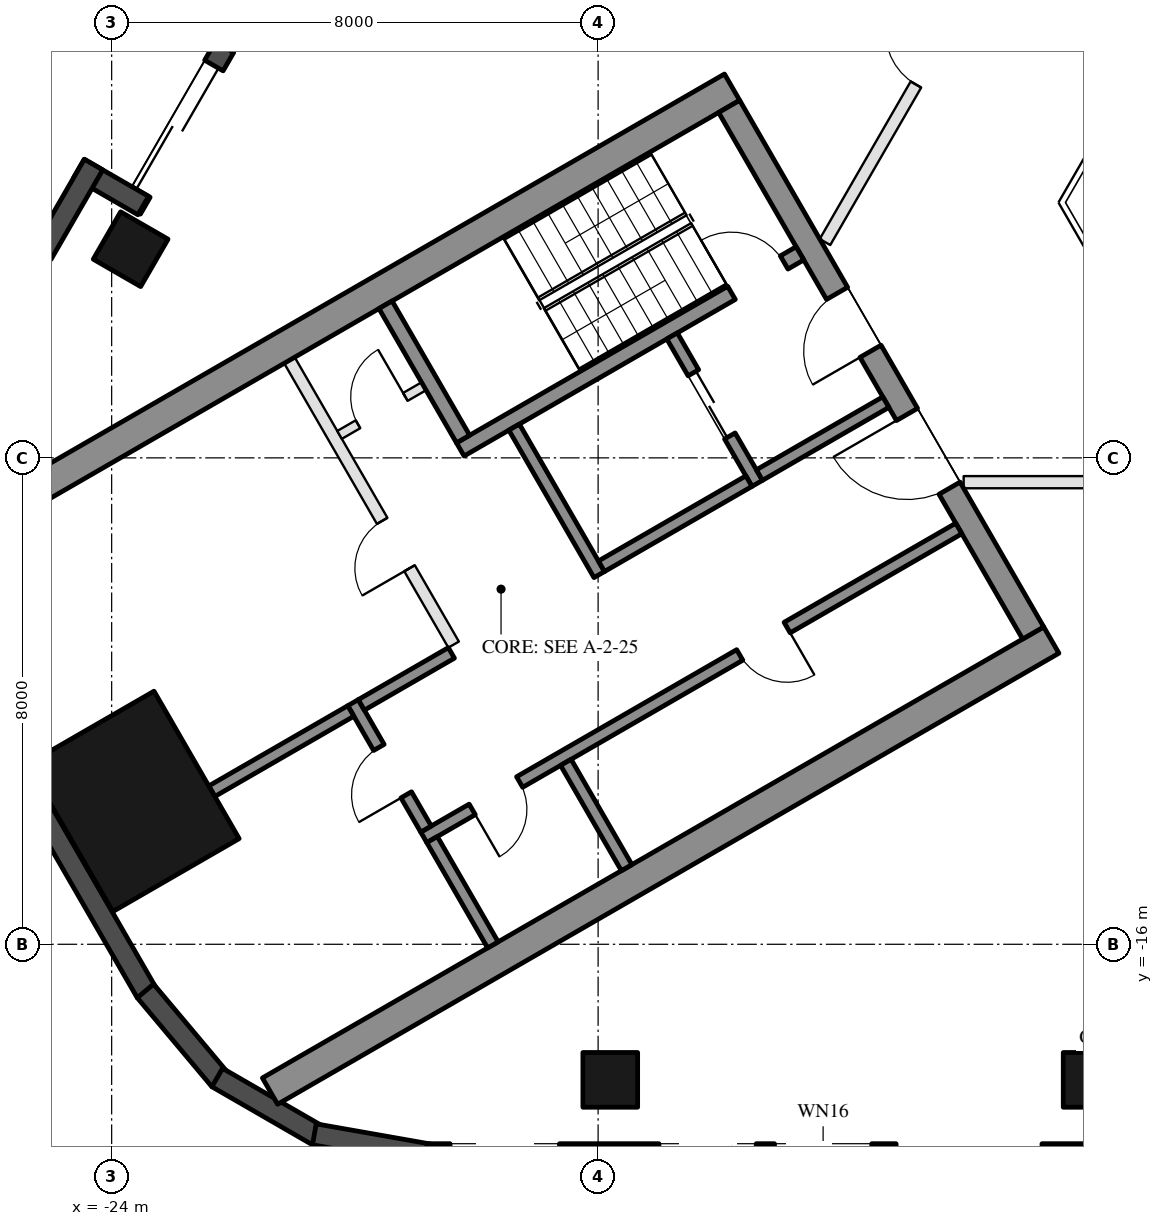
"""IFC4 building model, lengths in metres.
Left out: names, types, materials, properties, quantities, classifications, styles, units other than length and angle.
Written with IfcOpenShell. Run it as: python <this file> out.ifc"""

import sys

from ifc_helpers import new_model, si_unit, direction, frame, frame_2d, origin, origin_2d, place, context, subcontext, project, spatial, rectangle, hollow_rectangle, extrude, element, fill, save


model = new_model("IFC4")
c1 = context("Model", 3, precision=1e-05, world=origin(), true_north=direction((0.0, 1.0)))
c2 = subcontext(c1, "Body", "Model", "MODEL_VIEW")
j1 = project(units=[si_unit("LENGTHUNIT", "METRE"), si_unit("PLANEANGLEUNIT", "RADIAN")], contexts=[c1])
p1 = place(None, origin())
s1 = spatial("IfcSite", under=j1, at=p1, CompositionType="ELEMENT")
p2 = place(p1, origin())
s2 = spatial("IfcBuilding", under=s1, at=p2, CompositionType="ELEMENT")
p3 = place(p2, frame((0.0, 0.0, 113.1)))
s3 = spatial("IfcBuildingStorey", under=s2, at=p3, CompositionType="ELEMENT", Elevation=113.1)
for number, where, z_axis, x_axis in (
    (1, (-15.8, -18.23, 0.0), (0.0, 0.0, 1.0), (-1.0, 0.0, 0.0)),
    (2, (-7.9, -18.23, 0.0), (0.0, 0.0, 1.0), (-1.0, 0.0, 0.0)),
    (3, (-23.688, -4.568, 0.0), (0.0, 0.0, 1.0), (0.5, 0.866, 0.0)),
):
    element("IfcColumn", number, at=place(p3, frame(where, z_axis=z_axis, x_axis=x_axis)), inside=s3, PredefinedType="COLUMN", context=c2, shape_type="SweptSolid", body=[
        extrude(hollow_rectangle(XDim=0.9, YDim=0.9, WallThickness=0.04, at=origin_2d()), origin(), (0.0, 0.0, 1.0), 3.7),
    ])
p4 = place(p3, frame((-23.643, -13.65, 0.0), z_axis=(0.0, 0.0, 1.0), x_axis=(-0.5, 0.866025403784, 0.0)))
e4 = element("IfcColumn", 4, at=p4, inside=s3, PredefinedType="COLUMN", context=c2, shape_type="SweptSolid", body=[
    extrude(hollow_rectangle(XDim=2.8, YDim=2.4, WallThickness=0.07, at=origin_2d()), origin(), (0.0, 0.0, 1.0), 3.7),
])
p5 = place(p3, frame((-20.309, 1.934, 0.0), z_axis=(0.0, 0.0, 1.0), x_axis=(-0.499992114976, -0.866029956157, 0.0)))
e5 = element("IfcWall", 5, at=p5, inside=s3, PredefinedType="SOLIDWALL", context=c2, shape_type="SweptSolid", body=[
    extrude(rectangle(XDim=6.74, YDim=0.35, at=frame_2d((3.37, 0.0))), origin(), (0.0, 0.0, 1.0), 3.55),
])
p6 = place(p5, frame((4.02, 0.0, 0.0)))
e6 = element("IfcOpeningElement", 6, at=p6, cuts=e5, PredefinedType="OPENING", context=c2, shape_type="SweptSolid", body=[
    extrude(rectangle(XDim=2.4, YDim=2.4, at=frame_2d((1.2, 1.2))), frame((0.0, 0.185, 0.0), z_axis=(0.0, -1.0, 0.0), x_axis=(1.0, 0.0, 0.0)), (0.0, 0.0, 1.0), 0.37),
])
p7 = place(p5, frame((0.77, 0.0, 0.3)))
e7 = element("IfcOpeningElement", 7, at=p7, cuts=e5, PredefinedType="OPENING", context=c2, shape_type="SweptSolid", body=[
    extrude(rectangle(XDim=2.9, YDim=2.65, at=frame_2d((1.45, 1.325))), frame((0.0, 0.185, 0.0), z_axis=(0.0, -1.0, 0.0), x_axis=(1.0, 0.0, 0.0)), (0.0, 0.0, 1.0), 0.37),
])
p8 = place(p3, frame((-23.481, -3.85, 0.0), z_axis=(0.0, 0.0, 1.0), x_axis=(-0.866092288191, 0.499884134912, 0.0)))
e8 = element("IfcWall", 8, at=p8, inside=s3, PredefinedType="SOLIDWALL", context=c2, shape_type="SweptSolid", body=[
    extrude(rectangle(XDim=1.22, YDim=0.35, at=frame_2d((0.61, 0.0))), origin(), (0.0, 0.0, 1.0), 3.55),
])
p9 = place(p3, frame((-24.299, -3.176, 0.0), z_axis=(0.0, 0.0, 1.0), x_axis=(-0.500028278809, -0.866009076391, 0.0)))
e9 = element("IfcWall", 9, at=p9, inside=s3, PredefinedType="SOLIDWALL", context=c2, shape_type="SweptSolid", body=[
    extrude(rectangle(XDim=3.916, YDim=0.35, at=frame_2d((1.958, 0.0))), origin(), (0.0, 0.0, 1.0), 3.55),
])
p10 = place(p9, frame((1.7, 0.0, 0.3)))
e10 = element("IfcOpeningElement", 10, at=p10, cuts=e9, PredefinedType="OPENING", context=c2, shape_type="SweptSolid", body=[
    extrude(rectangle(XDim=1.8, YDim=2.65, at=frame_2d((0.9, 1.325))), frame((0.0, 0.185, 0.0), z_axis=(0.0, -1.0, 0.0), x_axis=(1.0, 0.0, 0.0)), (0.0, 0.0, 1.0), 0.37),
])
p11 = place(p3, frame((-26.257, -11.893, 0.0), z_axis=(0.0, 0.0, 1.0), x_axis=(0.500018773155, -0.866014564827, 0.0)))
e11 = element("IfcWall", 11, at=p11, inside=s3, PredefinedType="SOLIDWALL", context=c2, shape_type="SweptSolid", body=[
    extrude(rectangle(XDim=5.658, YDim=0.35, at=frame_2d((2.829, 0.0))), origin(), (0.0, 0.0, 1.0), 3.55),
])
for number, where, z_axis, x_axis in (
    (12, (-23.445, -16.768, 0.0), (0.0, 0.0, 1.0), (0.643, -0.766, 0.0)),
    (13, (-22.264, -18.192, 0.0), (0.0, 0.0, 1.0), (0.866, -0.5, 0.0)),
):
    element("IfcWall", number, at=place(p3, frame(where, z_axis=z_axis, x_axis=x_axis)), inside=s3, PredefinedType="SOLIDWALL", context=c2, shape_type="SweptSolid", body=[
        extrude(rectangle(XDim=1.91, YDim=0.35, at=frame_2d((0.955, 0.0))), origin(), (0.0, 0.0, 1.0), 3.55),
    ])
p12 = place(p3, frame((-20.667, -19.126, 0.0), z_axis=(0.0, 0.0, 1.0), x_axis=(0.984798995425, -0.173697837091, 0.0)))
e14 = element("IfcWall", 14, at=p12, inside=s3, PredefinedType="SOLIDWALL", context=c2, shape_type="SweptSolid", body=[
    extrude(rectangle(XDim=1.91, YDim=0.35, at=frame_2d((0.955, 0.0))), origin(), (0.0, 0.0, 1.0), 3.55),
])
p13 = place(p3, frame((-18.816, -19.455, 0.0), z_axis=(0.0, 0.0, 1.0), x_axis=(1.0, 0.0, 0.0)))
e15 = element("IfcWall", 15, at=p13, inside=s3, PredefinedType="SOLIDWALL", context=c2, shape_type="SweptSolid", body=[
    extrude(rectangle(XDim=11.816, YDim=0.35, at=frame_2d((5.908, 0.0))), origin(), (0.0, 0.0, 1.0), 3.55),
])
p14 = place(p13, frame((0.381, 0.0, 0.3)))
e16 = element("IfcOpeningElement", 16, at=p14, cuts=e15, PredefinedType="OPENING", context=c2, shape_type="SweptSolid", body=[
    extrude(rectangle(XDim=1.8, YDim=2.65, at=frame_2d((0.9, 1.325))), frame((0.0, 0.185, 0.0), z_axis=(0.0, -1.0, 0.0), x_axis=(1.0, 0.0, 0.0)), (0.0, 0.0, 1.0), 0.37),
])
p15 = place(p13, frame((7.716, 0.0, 0.0)))
e17 = element("IfcOpeningElement", 17, at=p15, cuts=e15, PredefinedType="OPENING", context=c2, shape_type="SweptSolid", body=[
    extrude(rectangle(XDim=2.4, YDim=2.4, at=frame_2d((1.2, 1.2))), frame((0.0, 0.185, 0.0), z_axis=(0.0, -1.0, 0.0), x_axis=(1.0, 0.0, 0.0)), (0.0, 0.0, 1.0), 0.37),
])
p16 = place(p13, frame((3.816, 0.0, 0.3)))
e18 = element("IfcOpeningElement", 18, at=p16, cuts=e15, PredefinedType="OPENING", context=c2, shape_type="SweptSolid", body=[
    extrude(rectangle(XDim=1.6, YDim=2.65, at=frame_2d((0.8, 1.325))), frame((0.0, 0.185, 0.0), z_axis=(0.0, -1.0, 0.0), x_axis=(1.0, 0.0, 0.0)), (0.0, 0.0, 1.0), 0.37),
])
p17 = place(p13, frame((5.716, 0.0, 0.3)))
e19 = element("IfcOpeningElement", 19, at=p17, cuts=e15, PredefinedType="OPENING", context=c2, shape_type="SweptSolid", body=[
    extrude(rectangle(XDim=1.6, YDim=2.65, at=frame_2d((0.8, 1.325))), frame((0.0, 0.185, 0.0), z_axis=(0.0, -1.0, 0.0), x_axis=(1.0, 0.0, 0.0)), (0.0, 0.0, 1.0), 0.37),
])
for number, where, z_axis, x_axis in (
    (20, (-13.797, -1.903, 0.0), (0.0, 0.0, 1.0), (-0.866, -0.5, 0.0)),
    (21, (-8.547, -10.997, 0.0), (0.0, 0.0, 1.0), (-0.866, -0.5, 0.0)),
):
    element("IfcWall", number, at=place(p3, frame(where, z_axis=z_axis, x_axis=x_axis)), inside=s3, PredefinedType="SHEAR", context=c2, shape_type="SweptSolid", body=[
        extrude(rectangle(XDim=14.837, YDim=0.5, at=frame_2d((7.418, 0.0))), origin(), (0.0, 0.0, 1.0), 3.5),
    ])
p18 = place(p3, frame((-13.845, -2.22, 0.0), z_axis=(0.0, 0.0, 1.0), x_axis=(0.500004234368, -0.866022959057, 0.0)))
e22 = element("IfcWall", 22, at=p18, inside=s3, PredefinedType="SHEAR", context=c2, shape_type="SweptSolid", body=[
    extrude(rectangle(XDim=10.0, YDim=0.4, at=frame_2d((5.0, 0.0))), origin(), (0.0, 0.0, 1.0), 3.5),
])
p19 = place(p18, frame((3.55, 0.0, 0.0)))
e23 = element("IfcOpeningElement", 23, at=p19, cuts=e22, PredefinedType="OPENING", context=c2, shape_type="SweptSolid", body=[
    extrude(rectangle(XDim=1.1, YDim=2.1, at=frame_2d((0.55, 1.05))), frame((0.0, 0.21, 0.0), z_axis=(0.0, -1.0, 0.0), x_axis=(1.0, 0.0, 0.0)), (0.0, 0.0, 1.0), 0.42),
])
p20 = place(p18, frame((5.85, 0.0, 0.0)))
e24 = element("IfcOpeningElement", 24, at=p20, cuts=e22, PredefinedType="OPENING", context=c2, shape_type="SweptSolid", body=[
    extrude(rectangle(XDim=1.4, YDim=2.1, at=frame_2d((0.7, 1.05))), frame((0.0, 0.21, 0.0), z_axis=(0.0, -1.0, 0.0), x_axis=(1.0, 0.0, 0.0)), (0.0, 0.0, 1.0), 0.42),
])
p21 = place(p3, frame((-12.681, -4.636, 0.0), z_axis=(0.0, 0.0, 1.0), x_axis=(-0.866021702275, -0.500006411147, 0.0)))
e25 = element("IfcWall", 25, at=p21, inside=s3, PredefinedType="SHEAR", context=c2, shape_type="SweptSolid", body=[
    extrude(rectangle(XDim=6.45, YDim=0.25, at=frame_2d((3.225, 0.0))), origin(), (0.0, 0.0, 1.0), 3.5),
])
p22 = place(p21, frame((0.3, 0.0, 0.0)))
e26 = element("IfcOpeningElement", 26, at=p22, cuts=e25, PredefinedType="OPENING", context=c2, shape_type="SweptSolid", body=[
    extrude(rectangle(XDim=1.0, YDim=2.1, at=frame_2d((0.5, 1.05))), frame((0.0, 0.135, 0.0), z_axis=(0.0, -1.0, 0.0), x_axis=(1.0, 0.0, 0.0)), (0.0, 0.0, 1.0), 0.27),
])
p23 = place(p3, frame((-19.496, -5.482, 0.0), z_axis=(0.0, 0.0, 1.0), x_axis=(0.499990435942, -0.866030925526, 0.0)))
e27 = element("IfcWall", 27, at=p23, inside=s3, PredefinedType="SHEAR", context=c2, shape_type="SweptSolid", body=[
    extrude(rectangle(XDim=2.55, YDim=0.25, at=frame_2d((1.275, 0.0))), origin(), (0.0, 0.0, 1.0), 3.5),
])
p24 = place(p3, frame((-17.381, -7.495, 0.0), z_axis=(0.0, 0.0, 1.0), x_axis=(0.500011755427, -0.866018616679, 0.0)))
e28 = element("IfcWall", 28, at=p24, inside=s3, PredefinedType="SHEAR", context=c2, shape_type="SweptSolid", body=[
    extrude(rectangle(XDim=2.8, YDim=0.2, at=frame_2d((1.4, 0.0))), origin(), (0.0, 0.0, 1.0), 3.5),
])
p25 = place(p3, frame((-14.783, -5.995, 0.0), z_axis=(0.0, 0.0, 1.0), x_axis=(0.49994636267, -0.866056369097, 0.0)))
e29 = element("IfcWall", 29, at=p25, inside=s3, PredefinedType="SHEAR", context=c2, shape_type="SweptSolid", body=[
    extrude(rectangle(XDim=2.8, YDim=0.2, at=frame_2d((1.4, 0.0))), origin(), (0.0, 0.0, 1.0), 3.5),
])
p26 = place(p25, frame((0.7, 0.0, 0.0)))
e30 = element("IfcOpeningElement", 30, at=p26, cuts=e29, PredefinedType="OPENING", context=c2, shape_type="SweptSolid", body=[
    extrude(rectangle(XDim=1.2, YDim=2.1, at=frame_2d((0.6, 1.05))), frame((0.0, 0.11, 0.0), z_axis=(0.0, -1.0, 0.0), x_axis=(1.0, 0.0, 0.0)), (0.0, 0.0, 1.0), 0.22),
])
p27 = place(p3, frame((-13.52, -8.383, 0.0), z_axis=(0.0, 0.0, 1.0), x_axis=(-0.866034573852, -0.49998411664, 0.0)))
e31 = element("IfcWall", 31, at=p27, inside=s3, PredefinedType="SHEAR", context=c2, shape_type="SweptSolid", body=[
    extrude(rectangle(XDim=2.8, YDim=0.2, at=frame_2d((1.4, 0.0))), origin(), (0.0, 0.0, 1.0), 3.5),
])
p28 = place(p3, frame((-11.268, -7.083, 0.0), z_axis=(0.0, 0.0, 1.0), x_axis=(-0.866050077142, -0.499957262057, 0.0)))
e32 = element("IfcWall", 32, at=p28, inside=s3, PredefinedType="SHEAR", context=c2, shape_type="SweptSolid", body=[
    extrude(rectangle(XDim=2.4, YDim=0.2, at=frame_2d((1.2, 0.0))), origin(), (0.0, 0.0, 1.0), 3.5),
])
p29 = place(p3, frame((-10.068, -9.162, 0.0), z_axis=(0.0, 0.0, 1.0), x_axis=(-0.866032725843, -0.499987317609, 0.0)))
e33 = element("IfcWall", 33, at=p29, inside=s3, PredefinedType="SHEAR", context=c2, shape_type="SweptSolid", body=[
    extrude(rectangle(XDim=10.16, YDim=0.2, at=frame_2d((5.08, 0.0))), origin(), (0.0, 0.0, 1.0), 3.5),
])
p30 = place(p29, frame((3.26, 0.0, 0.0)))
e34 = element("IfcOpeningElement", 34, at=p30, cuts=e33, PredefinedType="OPENING", context=c2, shape_type="SweptSolid", body=[
    extrude(rectangle(XDim=0.9, YDim=2.1, at=frame_2d((0.45, 1.05))), frame((0.0, 0.11, 0.0), z_axis=(0.0, -1.0, 0.0), x_axis=(1.0, 0.0, 0.0)), (0.0, 0.0, 1.0), 0.22),
])
p31 = place(p29, frame((8.34, 0.0, 0.0)))
e35 = element("IfcOpeningElement", 35, at=p31, cuts=e33, PredefinedType="OPENING", context=c2, shape_type="SweptSolid", body=[
    extrude(rectangle(XDim=0.9, YDim=2.1, at=frame_2d((0.45, 1.05))), frame((0.0, 0.11, 0.0), z_axis=(0.0, -1.0, 0.0), x_axis=(1.0, 0.0, 0.0)), (0.0, 0.0, 1.0), 0.22),
])
p32 = place(p3, frame((-20.031, -12.026, 0.0), z_axis=(0.0, 0.0, 1.0), x_axis=(0.500033551112, -0.866006032174, 0.0)))
e36 = element("IfcWall", 36, at=p32, inside=s3, PredefinedType="SHEAR", context=c2, shape_type="SweptSolid", body=[
    extrude(rectangle(XDim=2.4, YDim=0.2, at=frame_2d((1.2, 0.0))), origin(), (0.0, 0.0, 1.0), 3.5),
])
p33 = place(p32, frame((0.85, 0.0, 0.0)))
e37 = element("IfcOpeningElement", 37, at=p33, cuts=e36, PredefinedType="OPENING", context=c2, shape_type="SweptSolid", body=[
    extrude(rectangle(XDim=0.9, YDim=2.1, at=frame_2d((0.45, 1.05))), frame((0.0, 0.11, 0.0), z_axis=(0.0, -1.0, 0.0), x_axis=(1.0, 0.0, 0.0)), (0.0, 0.0, 1.0), 0.22),
])
p34 = place(p3, frame((-18.413, -11.208, 0.0), z_axis=(0.0, 0.0, 1.0), x_axis=(-0.866038183914, -0.499977863513, 0.0)))
e38 = element("IfcWall", 38, at=p34, inside=s3, PredefinedType="SHEAR", context=c2, shape_type="SweptSolid", body=[
    extrude(rectangle(XDim=1.71, YDim=0.2, at=frame_2d((0.855, 0.0))), origin(), (0.0, 0.0, 1.0), 3.5),
])
for number, where, z_axis, x_axis in (
    (39, (-16.531, -13.008, 0.0), (0.0, 0.0, 1.0), (0.5, -0.866, 0.0)),
    (40, (-18.73, -14.278, 0.0), (0.0, 0.0, 1.0), (0.5, -0.866, 0.0)),
):
    element("IfcWall", number, at=place(p3, frame(where, z_axis=z_axis, x_axis=x_axis)), inside=s3, PredefinedType="SHEAR", context=c2, shape_type="SweptSolid", body=[
        extrude(rectangle(XDim=2.0, YDim=0.2, at=frame_2d((1.0, 0.0))), origin(), (0.0, 0.0, 1.0), 3.5),
    ])
p35 = place(p3, frame((-20.067, -12.163, 0.0), z_axis=(0.0, 0.0, 1.0), x_axis=(-0.866060851709, -0.499938597367, 0.0)))
e41 = element("IfcWall", 41, at=p35, inside=s3, PredefinedType="SHEAR", context=c2, shape_type="SweptSolid", body=[
    extrude(rectangle(XDim=2.64, YDim=0.2, at=frame_2d((1.32, 0.0))), origin(), (0.0, 0.0, 1.0), 3.5),
])
p36 = place(p3, frame((-21.076, -6.395, 0.0), z_axis=(0.0, 0.0, 1.0), x_axis=(0.50001468107, -0.866016927499, 0.0)))
e42 = element("IfcWall", 42, at=p36, inside=s3, PredefinedType="PARTITIONING", context=c2, shape_type="SweptSolid", body=[
    extrude(rectangle(XDim=5.4, YDim=0.2, at=frame_2d((2.7, 0.0))), origin(), (0.0, 0.0, 1.0), 3.5),
])
p37 = place(p36, frame((3.05, 0.0, 0.0)))
e43 = element("IfcOpeningElement", 43, at=p37, cuts=e42, PredefinedType="OPENING", context=c2, shape_type="SweptSolid", body=[
    extrude(rectangle(XDim=0.9, YDim=2.1, at=frame_2d((0.45, 1.05))), frame((0.0, 0.11, 0.0), z_axis=(0.0, -1.0, 0.0), x_axis=(1.0, 0.0, 0.0)), (0.0, 0.0, 1.0), 0.22),
])
p38 = place(p3, frame((-18.866, -6.822, 0.0), z_axis=(0.0, 0.0, 1.0), x_axis=(-0.866028054938, -0.499995408039, 0.0)))
e44 = element("IfcWall", 44, at=p38, inside=s3, PredefinedType="PARTITIONING", context=c2, shape_type="SweptSolid", body=[
    extrude(rectangle(XDim=1.6, YDim=0.15, at=frame_2d((0.8, 0.0))), origin(), (0.0, 0.0, 1.0), 3.5),
])
p39 = place(p38, frame((0.35, 0.0, 0.0)))
e45 = element("IfcOpeningElement", 45, at=p39, cuts=e44, PredefinedType="OPENING", context=c2, shape_type="SweptSolid", body=[
    extrude(rectangle(XDim=0.9, YDim=2.1, at=frame_2d((0.45, 1.05))), frame((0.0, 0.085, 0.0), z_axis=(0.0, -1.0, 0.0), x_axis=(1.0, 0.0, 0.0)), (0.0, 0.0, 1.0), 0.17),
])
p40 = place(p3, frame((-0.807, -8.4, 0.0), z_axis=(0.0, 0.0, 1.0), x_axis=(-1.0, 0.0, 0.0)))
e46 = element("IfcWall", 46, at=p40, inside=s3, PredefinedType="PARTITIONING", context=c2, shape_type="SweptSolid", body=[
    extrude(rectangle(XDim=9.182, YDim=0.2, at=frame_2d((4.591, 0.0))), origin(), (0.0, 0.0, 1.0), 2.95),
])
p41 = place(p40, frame((4.091, 0.0, 0.0)))
e47 = element("IfcOpeningElement", 47, at=p41, cuts=e46, PredefinedType="OPENING", context=c2, shape_type="SweptSolid", body=[
    extrude(rectangle(XDim=1.0, YDim=2.1, at=frame_2d((0.5, 1.05))), frame((0.0, 0.11, 0.0), z_axis=(0.0, -1.0, 0.0), x_axis=(1.0, 0.0, 0.0)), (0.0, 0.0, 1.0), 0.22),
])
p42 = place(p3, frame((-12.269, -4.45, 0.0), z_axis=(0.0, 0.0, 1.0), x_axis=(0.500016026819, 0.866016150498, 0.0)))
e48 = element("IfcWall", 48, at=p42, inside=s3, PredefinedType="PARTITIONING", context=c2, shape_type="SweptSolid", body=[
    extrude(rectangle(XDim=6.983, YDim=0.2, at=frame_2d((3.491, 0.0))), origin(), (0.0, 0.0, 1.0), 2.95),
])
p43 = place(p42, frame((2.991, 0.0, 0.0)))
e49 = element("IfcOpeningElement", 49, at=p43, cuts=e48, PredefinedType="OPENING", context=c2, shape_type="SweptSolid", body=[
    extrude(rectangle(XDim=1.0, YDim=2.1, at=frame_2d((0.5, 1.05))), frame((0.0, 0.11, 0.0), z_axis=(0.0, -1.0, 0.0), x_axis=(1.0, 0.0, 0.0)), (0.0, 0.0, 1.0), 0.22),
])
p44 = place(p6, frame((2.4, 0.0, 0.0), z_axis=(0.0, 0.0, 1.0), x_axis=(-1.0, 0.0, 0.0)))
e50 = element("IfcDoor", 50, at=p44, inside=s3, OperationType="SLIDING_TO_LEFT", PredefinedType="DOOR", context=c2, shape_type="SweptSolid", body=[
    extrude(rectangle(XDim=2.4, YDim=2.4, at=frame_2d((1.2, 1.2))), frame((0.0, 0.025, 0.0), z_axis=(0.0, -1.0, 0.0), x_axis=(1.0, 0.0, 0.0)), (0.0, 0.0, 1.0), 0.05),
])
fill(e6, e50)
p45 = place(p26, origin())
e51 = element("IfcDoor", 51, at=p45, inside=s3, OperationType="DOUBLE_DOOR_SLIDING", PredefinedType="DOOR", context=c2, shape_type="SweptSolid", body=[
    extrude(rectangle(XDim=1.2, YDim=2.1, at=frame_2d((0.6, 1.05))), frame((0.0, 0.025, 0.0), z_axis=(0.0, -1.0, 0.0), x_axis=(1.0, 0.0, 0.0)), (0.0, 0.0, 1.0), 0.05),
])
fill(e30, e51)
p46 = place(p39, frame((0.9, 0.0, 0.0), z_axis=(0.0, 0.0, 1.0), x_axis=(-1.0, 0.0, 0.0)))
e52 = element("IfcDoor", 52, at=p46, inside=s3, OperationType="SINGLE_SWING_RIGHT", PredefinedType="DOOR", context=c2, shape_type="SweptSolid", body=[
    extrude(rectangle(XDim=0.9, YDim=2.1, at=frame_2d((0.45, 1.05))), frame((0.0, 0.025, 0.0), z_axis=(0.0, -1.0, 0.0), x_axis=(1.0, 0.0, 0.0)), (0.0, 0.0, 1.0), 0.05),
])
fill(e45, e52)
p47 = place(p30, origin())
e53 = element("IfcDoor", 53, at=p47, inside=s3, OperationType="SINGLE_SWING_LEFT", PredefinedType="DOOR", context=c2, shape_type="SweptSolid", body=[
    extrude(rectangle(XDim=0.9, YDim=2.1, at=frame_2d((0.45, 1.05))), frame((0.0, 0.025, 0.0), z_axis=(0.0, -1.0, 0.0), x_axis=(1.0, 0.0, 0.0)), (0.0, 0.0, 1.0), 0.05),
])
fill(e34, e53)
p48 = place(p31, origin())
e54 = element("IfcDoor", 54, at=p48, inside=s3, OperationType="SINGLE_SWING_RIGHT", PredefinedType="DOOR", context=c2, shape_type="SweptSolid", body=[
    extrude(rectangle(XDim=0.9, YDim=2.1, at=frame_2d((0.45, 1.05))), frame((0.0, 0.025, 0.0), z_axis=(0.0, -1.0, 0.0), x_axis=(1.0, 0.0, 0.0)), (0.0, 0.0, 1.0), 0.05),
])
fill(e35, e54)
p49 = place(p33, frame((0.9, 0.0, 0.0), z_axis=(0.0, 0.0, 1.0), x_axis=(-1.0, 0.0, 0.0)))
e55 = element("IfcDoor", 55, at=p49, inside=s3, OperationType="SINGLE_SWING_LEFT", PredefinedType="DOOR", context=c2, shape_type="SweptSolid", body=[
    extrude(rectangle(XDim=0.9, YDim=2.1, at=frame_2d((0.45, 1.05))), frame((0.0, 0.025, 0.0), z_axis=(0.0, -1.0, 0.0), x_axis=(1.0, 0.0, 0.0)), (0.0, 0.0, 1.0), 0.05),
])
fill(e37, e55)
p50 = place(p37, frame((0.9, 0.0, 0.0), z_axis=(0.0, 0.0, 1.0), x_axis=(-1.0, 0.0, 0.0)))
e56 = element("IfcDoor", 56, at=p50, inside=s3, OperationType="SINGLE_SWING_LEFT", PredefinedType="DOOR", context=c2, shape_type="SweptSolid", body=[
    extrude(rectangle(XDim=0.9, YDim=2.1, at=frame_2d((0.45, 1.05))), frame((0.0, 0.025, 0.0), z_axis=(0.0, -1.0, 0.0), x_axis=(1.0, 0.0, 0.0)), (0.0, 0.0, 1.0), 0.05),
])
fill(e43, e56)
p51 = place(p19, frame((1.1, 0.0, 0.0), z_axis=(0.0, 0.0, 1.0), x_axis=(-1.0, 0.0, 0.0)))
e57 = element("IfcDoor", 57, at=p51, inside=s3, OperationType="SINGLE_SWING_LEFT", PredefinedType="DOOR", context=c2, shape_type="SweptSolid", body=[
    extrude(rectangle(XDim=1.1, YDim=2.1, at=frame_2d((0.55, 1.05))), frame((0.0, 0.025, 0.0), z_axis=(0.0, -1.0, 0.0), x_axis=(1.0, 0.0, 0.0)), (0.0, 0.0, 1.0), 0.05),
])
fill(e23, e57)
p52 = place(p20, frame((1.4, 0.0, 0.0), z_axis=(0.0, 0.0, 1.0), x_axis=(-1.0, 0.0, 0.0)))
e58 = element("IfcDoor", 58, at=p52, inside=s3, OperationType="DOUBLE_DOOR_SINGLE_SWING", PredefinedType="DOOR", context=c2, shape_type="SweptSolid", body=[
    extrude(rectangle(XDim=1.4, YDim=2.1, at=frame_2d((0.7, 1.05))), frame((0.0, 0.025, 0.0), z_axis=(0.0, -1.0, 0.0), x_axis=(1.0, 0.0, 0.0)), (0.0, 0.0, 1.0), 0.05),
])
fill(e24, e58)
p53 = place(p22, frame((1.0, 0.0, 0.0), z_axis=(0.0, 0.0, 1.0), x_axis=(-1.0, 0.0, 0.0)))
e59 = element("IfcDoor", 59, at=p53, inside=s3, OperationType="SINGLE_SWING_LEFT", PredefinedType="DOOR", context=c2, shape_type="SweptSolid", body=[
    extrude(rectangle(XDim=1.0, YDim=2.1, at=frame_2d((0.5, 1.05))), frame((0.0, 0.025, 0.0), z_axis=(0.0, -1.0, 0.0), x_axis=(1.0, 0.0, 0.0)), (0.0, 0.0, 1.0), 0.05),
])
fill(e26, e59)
p54 = place(p43, origin())
e60 = element("IfcDoor", 60, at=p54, inside=s3, OperationType="SINGLE_SWING_RIGHT", PredefinedType="DOOR", context=c2, shape_type="SweptSolid", body=[
    extrude(rectangle(XDim=1.0, YDim=2.1, at=frame_2d((0.5, 1.05))), frame((0.0, 0.025, 0.0), z_axis=(0.0, -1.0, 0.0), x_axis=(1.0, 0.0, 0.0)), (0.0, 0.0, 1.0), 0.05),
])
fill(e49, e60)
save(model, sys.argv[1])
